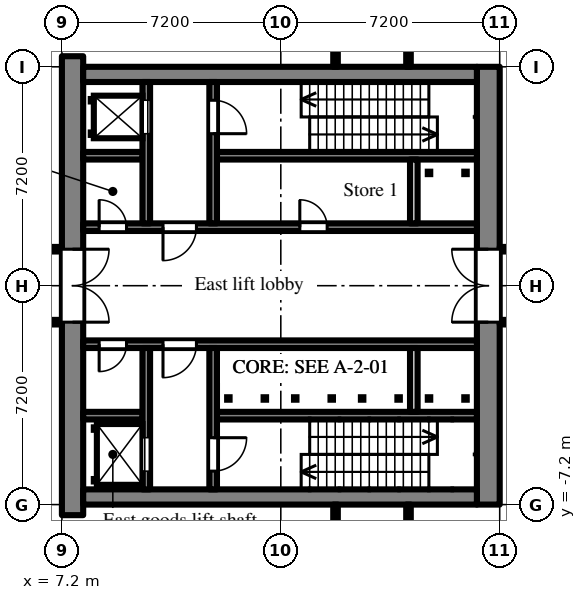
"""IFC4 building model, lengths in metres.
Left out: names, types, materials, properties, quantities, classifications, styles, units other than length and angle.
Written with IfcOpenShell. Run it as: python <this file> out.ifc"""

import sys

from ifc_helpers import new_model, si_unit, direction, frame, frame_2d, origin, place, context, subcontext, project, spatial, rectangle, extrude, element, fill, save


model = new_model("IFC4")
c1 = context("Model", 3, precision=1e-05, world=origin(), true_north=direction((0.0, 1.0)))
c2 = subcontext(c1, "Body", "Model", "MODEL_VIEW")
j1 = project(units=[si_unit("LENGTHUNIT", "METRE"), si_unit("PLANEANGLEUNIT", "RADIAN")], contexts=[c1])
p1 = place(None, origin())
s1 = spatial("IfcSite", under=j1, at=p1, CompositionType="ELEMENT")
p2 = place(p1, origin())
s2 = spatial("IfcBuilding", under=s1, at=p2, CompositionType="ELEMENT")
p3 = place(p2, frame((0.0, 0.0, -4.8)))
s3 = spatial("IfcBuildingStorey", under=s2, at=p3, CompositionType="ELEMENT", Elevation=-4.8)
p4 = place(p3, frame((7.55, -7.548, 0.0), z_axis=(0.0, 0.0, 1.0), x_axis=(0.0, 1.0, 0.0)))
e1 = element("IfcWall", 1, at=p4, inside=s3, PredefinedType="SHEAR", context=c2, shape_type="SweptSolid", body=[
    extrude(rectangle(XDim=15.096, YDim=0.7, at=frame_2d((7.548, 0.0))), origin(), (0.0, 0.0, 1.0), 4.35),
])
p5 = place(p4, frame((6.348, 0.0, 0.0)))
e2 = element("IfcOpeningElement", 2, at=p5, cuts=e1, PredefinedType="OPENING", context=c2, shape_type="SweptSolid", body=[
    extrude(rectangle(XDim=2.4, YDim=2.2, at=frame_2d((1.2, 1.1))), frame((0.0, 0.36, 0.0), z_axis=(0.0, -1.0, 0.0), x_axis=(1.0, 0.0, 0.0)), (0.0, 0.0, 1.0), 0.72),
])
p6 = place(p3, frame((21.225, -7.2, 0.0), z_axis=(0.0, 0.0, 1.0), x_axis=(0.0, 1.0, 0.0)))
e3 = element("IfcWall", 3, at=p6, inside=s3, PredefinedType="SHEAR", context=c2, shape_type="SweptSolid", body=[
    extrude(rectangle(XDim=14.4, YDim=0.75, at=frame_2d((7.2, 0.0))), origin(), (0.0, 0.0, 1.0), 4.35),
])
p7 = place(p6, frame((6.0, 0.0, 0.0)))
e4 = element("IfcOpeningElement", 4, at=p7, cuts=e3, PredefinedType="OPENING", context=c2, shape_type="SweptSolid", body=[
    extrude(rectangle(XDim=2.4, YDim=2.2, at=frame_2d((1.2, 1.1))), frame((0.0, 0.385, 0.0), z_axis=(0.0, -1.0, 0.0), x_axis=(1.0, 0.0, 0.0)), (0.0, 0.0, 1.0), 0.77),
])
p8 = place(p3, frame((7.9, 6.95, 0.0), z_axis=(0.0, 0.0, 1.0), x_axis=(1.0, 0.0, 0.0)))
e5 = element("IfcWall", 5, at=p8, inside=s3, PredefinedType="SHEAR", context=c2, shape_type="SweptSolid", body=[
    extrude(rectangle(XDim=12.95, YDim=0.5, at=frame_2d((6.475, 0.0))), origin(), (0.0, 0.0, 1.0), 4.35),
])
p9 = place(p3, frame((7.9, 1.925, 0.0), z_axis=(0.0, 0.0, 1.0), x_axis=(1.0, 0.0, 0.0)))
e6 = element("IfcWall", 6, at=p9, inside=s3, PredefinedType="SHEAR", context=c2, shape_type="SweptSolid", body=[
    extrude(rectangle(XDim=12.95, YDim=0.25, at=frame_2d((6.475, 0.0))), origin(), (0.0, 0.0, 1.0), 4.35),
])
p10 = place(p9, frame((0.525, 0.0, 0.0)))
e7 = element("IfcOpeningElement", 7, at=p10, cuts=e6, PredefinedType="OPENING", context=c2, shape_type="SweptSolid", body=[
    extrude(rectangle(XDim=0.9, YDim=2.1, at=frame_2d((0.45, 1.05))), frame((0.0, 0.135, 0.0), z_axis=(0.0, -1.0, 0.0), x_axis=(1.0, 0.0, 0.0)), (0.0, 0.0, 1.0), 0.27),
])
p11 = place(p9, frame((2.625, 0.0, 0.0)))
e8 = element("IfcOpeningElement", 8, at=p11, cuts=e6, PredefinedType="OPENING", context=c2, shape_type="SweptSolid", body=[
    extrude(rectangle(XDim=1.1, YDim=2.1, at=frame_2d((0.55, 1.05))), frame((0.0, 0.135, 0.0), z_axis=(0.0, -1.0, 0.0), x_axis=(1.0, 0.0, 0.0)), (0.0, 0.0, 1.0), 0.27),
])
p12 = place(p9, frame((7.125, 0.0, 0.0)))
e9 = element("IfcOpeningElement", 9, at=p12, cuts=e6, PredefinedType="OPENING", context=c2, shape_type="SweptSolid", body=[
    extrude(rectangle(XDim=0.9, YDim=2.1, at=frame_2d((0.45, 1.05))), frame((0.0, 0.135, 0.0), z_axis=(0.0, -1.0, 0.0), x_axis=(1.0, 0.0, 0.0)), (0.0, 0.0, 1.0), 0.27),
])
p13 = place(p3, frame((7.9, 4.275, 0.0), z_axis=(0.0, 0.0, 1.0), x_axis=(1.0, 0.0, 0.0)))
e10 = element("IfcWall", 10, at=p13, inside=s3, PredefinedType="SHEAR", context=c2, shape_type="SweptSolid", body=[
    extrude(rectangle(XDim=1.95, YDim=0.25, at=frame_2d((0.975, 0.0))), origin(), (0.0, 0.0, 1.0), 4.35),
])
p14 = place(p3, frame((12.3, 4.275, 0.0), z_axis=(0.0, 0.0, 1.0), x_axis=(1.0, 0.0, 0.0)))
e11 = element("IfcWall", 11, at=p14, inside=s3, PredefinedType="SHEAR", context=c2, shape_type="SweptSolid", body=[
    extrude(rectangle(XDim=8.55, YDim=0.25, at=frame_2d((4.275, 0.0))), origin(), (0.0, 0.0, 1.0), 4.35),
])
p15 = place(p3, frame((9.975, 2.05, 0.0), z_axis=(0.0, 0.0, 1.0), x_axis=(0.0, 1.0, 0.0)))
e12 = element("IfcWall", 12, at=p15, inside=s3, PredefinedType="SHEAR", context=c2, shape_type="SweptSolid", body=[
    extrude(rectangle(XDim=4.65, YDim=0.25, at=frame_2d((2.325, 0.0))), origin(), (0.0, 0.0, 1.0), 4.35),
])
p16 = place(p15, frame((2.95, 0.0, 0.0)))
e13 = element("IfcOpeningElement", 13, at=p16, cuts=e12, PredefinedType="OPENING", context=c2, shape_type="SweptSolid", body=[
    extrude(rectangle(XDim=1.1, YDim=2.1, at=frame_2d((0.55, 1.05))), frame((0.0, 0.135, 0.0), z_axis=(0.0, -1.0, 0.0), x_axis=(1.0, 0.0, 0.0)), (0.0, 0.0, 1.0), 0.27),
])
p17 = place(p3, frame((12.175, 2.05, 0.0), z_axis=(0.0, 0.0, 1.0), x_axis=(0.0, 1.0, 0.0)))
e14 = element("IfcWall", 14, at=p17, inside=s3, PredefinedType="SHEAR", context=c2, shape_type="SweptSolid", body=[
    extrude(rectangle(XDim=4.65, YDim=0.25, at=frame_2d((2.325, 0.0))), origin(), (0.0, 0.0, 1.0), 4.35),
])
p18 = place(p17, frame((2.95, 0.0, 0.0)))
e15 = element("IfcOpeningElement", 15, at=p18, cuts=e14, PredefinedType="OPENING", context=c2, shape_type="SweptSolid", body=[
    extrude(rectangle(XDim=1.1, YDim=2.1, at=frame_2d((0.55, 1.05))), frame((0.0, 0.135, 0.0), z_axis=(0.0, -1.0, 0.0), x_axis=(1.0, 0.0, 0.0)), (0.0, 0.0, 1.0), 0.27),
])
p19 = place(p3, frame((18.775, 2.05, 0.0), z_axis=(0.0, 0.0, 1.0), x_axis=(0.0, 1.0, 0.0)))
e16 = element("IfcWall", 16, at=p19, inside=s3, PredefinedType="PARTITIONING", context=c2, shape_type="SweptSolid", body=[
    extrude(rectangle(XDim=2.1, YDim=0.25, at=frame_2d((1.05, 0.0))), origin(), (0.0, 0.0, 1.0), 4.35),
])
p20 = place(p3, frame((7.9, -6.95, 0.0), z_axis=(0.0, 0.0, 1.0), x_axis=(1.0, 0.0, 0.0)))
e17 = element("IfcWall", 17, at=p20, inside=s3, PredefinedType="SHEAR", context=c2, shape_type="SweptSolid", body=[
    extrude(rectangle(XDim=12.95, YDim=0.5, at=frame_2d((6.475, 0.0))), origin(), (0.0, 0.0, 1.0), 4.35),
])
p21 = place(p3, frame((7.9, -1.925, 0.0), z_axis=(0.0, 0.0, 1.0), x_axis=(1.0, 0.0, 0.0)))
e18 = element("IfcWall", 18, at=p21, inside=s3, PredefinedType="SHEAR", context=c2, shape_type="SweptSolid", body=[
    extrude(rectangle(XDim=12.95, YDim=0.25, at=frame_2d((6.475, 0.0))), origin(), (0.0, 0.0, 1.0), 4.35),
])
p22 = place(p21, frame((0.525, 0.0, 0.0)))
e19 = element("IfcOpeningElement", 19, at=p22, cuts=e18, PredefinedType="OPENING", context=c2, shape_type="SweptSolid", body=[
    extrude(rectangle(XDim=0.9, YDim=2.1, at=frame_2d((0.45, 1.05))), frame((0.0, 0.135, 0.0), z_axis=(0.0, -1.0, 0.0), x_axis=(1.0, 0.0, 0.0)), (0.0, 0.0, 1.0), 0.27),
])
p23 = place(p21, frame((2.625, 0.0, 0.0)))
e20 = element("IfcOpeningElement", 20, at=p23, cuts=e18, PredefinedType="OPENING", context=c2, shape_type="SweptSolid", body=[
    extrude(rectangle(XDim=1.1, YDim=2.1, at=frame_2d((0.55, 1.05))), frame((0.0, 0.135, 0.0), z_axis=(0.0, -1.0, 0.0), x_axis=(1.0, 0.0, 0.0)), (0.0, 0.0, 1.0), 0.27),
])
p24 = place(p3, frame((7.9, -4.275, 0.0), z_axis=(0.0, 0.0, 1.0), x_axis=(1.0, 0.0, 0.0)))
e21 = element("IfcWall", 21, at=p24, inside=s3, PredefinedType="SHEAR", context=c2, shape_type="SweptSolid", body=[
    extrude(rectangle(XDim=1.95, YDim=0.25, at=frame_2d((0.975, 0.0))), origin(), (0.0, 0.0, 1.0), 4.35),
])
p25 = place(p3, frame((12.3, -4.275, 0.0), z_axis=(0.0, 0.0, 1.0), x_axis=(1.0, 0.0, 0.0)))
e22 = element("IfcWall", 22, at=p25, inside=s3, PredefinedType="SHEAR", context=c2, shape_type="SweptSolid", body=[
    extrude(rectangle(XDim=8.55, YDim=0.25, at=frame_2d((4.275, 0.0))), origin(), (0.0, 0.0, 1.0), 4.35),
])
p26 = place(p3, frame((9.975, -2.05, 0.0), z_axis=(0.0, 0.0, 1.0), x_axis=(0.0, -1.0, 0.0)))
e23 = element("IfcWall", 23, at=p26, inside=s3, PredefinedType="SHEAR", context=c2, shape_type="SweptSolid", body=[
    extrude(rectangle(XDim=4.65, YDim=0.25, at=frame_2d((2.325, 0.0))), origin(), (0.0, 0.0, 1.0), 4.35),
])
p27 = place(p26, frame((2.95, 0.0, 0.0)))
e24 = element("IfcOpeningElement", 24, at=p27, cuts=e23, PredefinedType="OPENING", context=c2, shape_type="SweptSolid", body=[
    extrude(rectangle(XDim=1.1, YDim=2.1, at=frame_2d((0.55, 1.05))), frame((0.0, 0.135, 0.0), z_axis=(0.0, -1.0, 0.0), x_axis=(1.0, 0.0, 0.0)), (0.0, 0.0, 1.0), 0.27),
])
p28 = place(p3, frame((12.175, -2.05, 0.0), z_axis=(0.0, 0.0, 1.0), x_axis=(0.0, -1.0, 0.0)))
e25 = element("IfcWall", 25, at=p28, inside=s3, PredefinedType="SHEAR", context=c2, shape_type="SweptSolid", body=[
    extrude(rectangle(XDim=4.65, YDim=0.25, at=frame_2d((2.325, 0.0))), origin(), (0.0, 0.0, 1.0), 4.35),
])
p29 = place(p28, frame((2.95, 0.0, 0.0)))
e26 = element("IfcOpeningElement", 26, at=p29, cuts=e25, PredefinedType="OPENING", context=c2, shape_type="SweptSolid", body=[
    extrude(rectangle(XDim=1.1, YDim=2.1, at=frame_2d((0.55, 1.05))), frame((0.0, 0.135, 0.0), z_axis=(0.0, -1.0, 0.0), x_axis=(1.0, 0.0, 0.0)), (0.0, 0.0, 1.0), 0.27),
])
p30 = place(p3, frame((18.775, -2.05, 0.0), z_axis=(0.0, 0.0, 1.0), x_axis=(0.0, -1.0, 0.0)))
e27 = element("IfcWall", 27, at=p30, inside=s3, PredefinedType="PARTITIONING", context=c2, shape_type="SweptSolid", body=[
    extrude(rectangle(XDim=2.1, YDim=0.25, at=frame_2d((1.05, 0.0))), origin(), (0.0, 0.0, 1.0), 4.35),
])
p31 = place(p3, frame((1.275, -1.2, 0.0), z_axis=(0.0, 0.0, 1.0), x_axis=(1.0, 0.0, 0.0)))
e28 = element("IfcWall", 28, at=p31, inside=s3, PredefinedType="PARTITIONING", context=c2, shape_type="SweptSolid", body=[
    extrude(rectangle(XDim=5.925, YDim=0.15, at=frame_2d((2.962, 0.0))), origin(), (0.0, 0.0, 1.0), 4.35),
])
p32 = place(p3, frame((1.275, 1.2, 0.0), z_axis=(0.0, 0.0, 1.0), x_axis=(1.0, 0.0, 0.0)))
e29 = element("IfcWall", 29, at=p32, inside=s3, PredefinedType="PARTITIONING", context=c2, shape_type="SweptSolid", body=[
    extrude(rectangle(XDim=5.925, YDim=0.15, at=frame_2d((2.962, 0.0))), origin(), (0.0, 0.0, 1.0), 4.35),
])
p33 = place(p32, frame((0.575, 0.0, 0.0)))
e30 = element("IfcOpeningElement", 30, at=p33, cuts=e29, PredefinedType="OPENING", context=c2, shape_type="SweptSolid", body=[
    extrude(rectangle(XDim=1.8, YDim=2.1, at=frame_2d((0.9, 1.05))), frame((0.0, 0.085, 0.0), z_axis=(0.0, -1.0, 0.0), x_axis=(1.0, 0.0, 0.0)), (0.0, 0.0, 1.0), 0.17),
])
p34 = place(p3, frame((16.2, -16.725, 0.0), z_axis=(0.0, 0.0, 1.0), x_axis=(0.0, 1.0, 0.0)))
e31 = element("IfcWall", 31, at=p34, inside=s3, PredefinedType="PARTITIONING", context=c2, shape_type="SweptSolid", body=[
    extrude(rectangle(XDim=9.525, YDim=0.15, at=frame_2d((4.763, 0.0))), origin(), (0.0, 0.0, 1.0), 4.35),
])
p35 = place(p34, frame((3.525, 0.0, 0.0)))
e32 = element("IfcOpeningElement", 32, at=p35, cuts=e31, PredefinedType="OPENING", context=c2, shape_type="SweptSolid", body=[
    extrude(rectangle(XDim=2.4, YDim=2.1, at=frame_2d((1.2, 1.05))), frame((0.0, 0.085, 0.0), z_axis=(0.0, -1.0, 0.0), x_axis=(1.0, 0.0, 0.0)), (0.0, 0.0, 1.0), 0.17),
])
p36 = place(p3, frame((16.2, 7.2, 0.0), z_axis=(0.0, 0.0, 1.0), x_axis=(0.0, 1.0, 0.0)))
e33 = element("IfcWall", 33, at=p36, inside=s3, PredefinedType="PARTITIONING", context=c2, shape_type="SweptSolid", body=[
    extrude(rectangle(XDim=9.525, YDim=0.15, at=frame_2d((4.763, 0.0))), origin(), (0.0, 0.0, 1.0), 4.35),
])
p37 = place(p36, frame((3.05, 0.0, 0.0)))
e34 = element("IfcOpeningElement", 34, at=p37, cuts=e33, PredefinedType="OPENING", context=c2, shape_type="SweptSolid", body=[
    extrude(rectangle(XDim=1.8, YDim=2.1, at=frame_2d((0.9, 1.05))), frame((0.0, 0.085, 0.0), z_axis=(0.0, -1.0, 0.0), x_axis=(1.0, 0.0, 0.0)), (0.0, 0.0, 1.0), 0.17),
])
p38 = place(p3, frame((18.6, -16.875, 0.0), z_axis=(0.0, 0.0, 1.0), x_axis=(0.0, 1.0, 0.0)))
e35 = element("IfcWall", 35, at=p38, inside=s3, PredefinedType="PARTITIONING", context=c2, shape_type="SweptSolid", body=[
    extrude(rectangle(XDim=9.675, YDim=0.15, at=frame_2d((4.837, 0.0))), origin(), (0.0, 0.0, 1.0), 4.35),
])
p39 = place(p38, frame((7.225, 0.0, 0.0)))
e36 = element("IfcOpeningElement", 36, at=p39, cuts=e35, PredefinedType="OPENING", context=c2, shape_type="SweptSolid", body=[
    extrude(rectangle(XDim=1.8, YDim=2.1, at=frame_2d((0.9, 1.05))), frame((0.0, 0.085, 0.0), z_axis=(0.0, -1.0, 0.0), x_axis=(1.0, 0.0, 0.0)), (0.0, 0.0, 1.0), 0.17),
])
p40 = place(p3, frame((18.6, 7.2, 0.0), z_axis=(0.0, 0.0, 1.0), x_axis=(0.0, 1.0, 0.0)))
e37 = element("IfcWall", 37, at=p40, inside=s3, PredefinedType="PARTITIONING", context=c2, shape_type="SweptSolid", body=[
    extrude(rectangle(XDim=9.675, YDim=0.15, at=frame_2d((4.837, 0.0))), origin(), (0.0, 0.0, 1.0), 4.35),
])
p41 = place(p40, frame((0.85, 0.0, 0.0)))
e38 = element("IfcOpeningElement", 38, at=p41, cuts=e37, PredefinedType="OPENING", context=c2, shape_type="SweptSolid", body=[
    extrude(rectangle(XDim=1.8, YDim=2.1, at=frame_2d((0.9, 1.05))), frame((0.0, 0.085, 0.0), z_axis=(0.0, -1.0, 0.0), x_axis=(1.0, 0.0, 0.0)), (0.0, 0.0, 1.0), 0.17),
])
p42 = place(p40, frame((7.15, 0.0, 0.0)))
e39 = element("IfcOpeningElement", 39, at=p42, cuts=e37, PredefinedType="OPENING", context=c2, shape_type="SweptSolid", body=[
    extrude(rectangle(XDim=1.8, YDim=2.1, at=frame_2d((0.9, 1.05))), frame((0.0, 0.085, 0.0), z_axis=(0.0, -1.0, 0.0), x_axis=(1.0, 0.0, 0.0)), (0.0, 0.0, 1.0), 0.17),
])
p43 = place(p3, frame((21.6, -1.2, 0.0), z_axis=(0.0, 0.0, 1.0), x_axis=(1.0, 0.0, 0.0)))
e40 = element("IfcWall", 40, at=p43, inside=s3, PredefinedType="PARTITIONING", context=c2, shape_type="SweptSolid", body=[
    extrude(rectangle(XDim=9.525, YDim=0.15, at=frame_2d((4.762, 0.0))), origin(), (0.0, 0.0, 1.0), 4.35),
])
p44 = place(p43, frame((0.85, 0.0, 0.0)))
e41 = element("IfcOpeningElement", 41, at=p44, cuts=e40, PredefinedType="OPENING", context=c2, shape_type="SweptSolid", body=[
    extrude(rectangle(XDim=1.8, YDim=2.1, at=frame_2d((0.9, 1.05))), frame((0.0, 0.085, 0.0), z_axis=(0.0, -1.0, 0.0), x_axis=(1.0, 0.0, 0.0)), (0.0, 0.0, 1.0), 0.17),
])
p45 = place(p43, frame((7.15, 0.0, 0.0)))
e42 = element("IfcOpeningElement", 42, at=p45, cuts=e40, PredefinedType="OPENING", context=c2, shape_type="SweptSolid", body=[
    extrude(rectangle(XDim=1.8, YDim=2.1, at=frame_2d((0.9, 1.05))), frame((0.0, 0.085, 0.0), z_axis=(0.0, -1.0, 0.0), x_axis=(1.0, 0.0, 0.0)), (0.0, 0.0, 1.0), 0.17),
])
p46 = place(p3, frame((21.6, 1.2, 0.0), z_axis=(0.0, 0.0, 1.0), x_axis=(1.0, 0.0, 0.0)))
e43 = element("IfcWall", 43, at=p46, inside=s3, PredefinedType="PARTITIONING", context=c2, shape_type="SweptSolid", body=[
    extrude(rectangle(XDim=9.525, YDim=0.15, at=frame_2d((4.762, 0.0))), origin(), (0.0, 0.0, 1.0), 4.35),
])
p47 = place(p46, frame((0.65, 0.0, 0.0)))
e44 = element("IfcOpeningElement", 44, at=p47, cuts=e43, PredefinedType="OPENING", context=c2, shape_type="SweptSolid", body=[
    extrude(rectangle(XDim=1.8, YDim=2.1, at=frame_2d((0.9, 1.05))), frame((0.0, 0.085, 0.0), z_axis=(0.0, -1.0, 0.0), x_axis=(1.0, 0.0, 0.0)), (0.0, 0.0, 1.0), 0.17),
])
p48 = place(p16, origin())
e45 = element("IfcDoor", 45, at=p48, inside=s3, OperationType="SLIDING_TO_LEFT", PredefinedType="DOOR", context=c2, shape_type="SweptSolid", body=[
    extrude(rectangle(XDim=1.1, YDim=2.1, at=frame_2d((0.55, 1.05))), frame((0.0, 0.025, 0.0), z_axis=(0.0, -1.0, 0.0), x_axis=(1.0, 0.0, 0.0)), (0.0, 0.0, 1.0), 0.05),
])
fill(e13, e45)
p49 = place(p27, origin())
e46 = element("IfcDoor", 46, at=p49, inside=s3, OperationType="SLIDING_TO_LEFT", PredefinedType="DOOR", context=c2, shape_type="SweptSolid", body=[
    extrude(rectangle(XDim=1.1, YDim=2.1, at=frame_2d((0.55, 1.05))), frame((0.0, 0.025, 0.0), z_axis=(0.0, -1.0, 0.0), x_axis=(1.0, 0.0, 0.0)), (0.0, 0.0, 1.0), 0.05),
])
fill(e24, e46)
p50 = place(p18, frame((1.1, 0.0, 0.0), z_axis=(0.0, 0.0, 1.0), x_axis=(-1.0, 0.0, 0.0)))
e47 = element("IfcDoor", 47, at=p50, inside=s3, OperationType="SINGLE_SWING_RIGHT", PredefinedType="DOOR", context=c2, shape_type="SweptSolid", body=[
    extrude(rectangle(XDim=1.1, YDim=2.1, at=frame_2d((0.55, 1.05))), frame((0.0, 0.025, 0.0), z_axis=(0.0, -1.0, 0.0), x_axis=(1.0, 0.0, 0.0)), (0.0, 0.0, 1.0), 0.05),
])
fill(e15, e47)
p51 = place(p29, origin())
e48 = element("IfcDoor", 48, at=p51, inside=s3, OperationType="SINGLE_SWING_LEFT", PredefinedType="DOOR", context=c2, shape_type="SweptSolid", body=[
    extrude(rectangle(XDim=1.1, YDim=2.1, at=frame_2d((0.55, 1.05))), frame((0.0, 0.025, 0.0), z_axis=(0.0, -1.0, 0.0), x_axis=(1.0, 0.0, 0.0)), (0.0, 0.0, 1.0), 0.05),
])
fill(e26, e48)
p52 = place(p10, origin())
e49 = element("IfcDoor", 49, at=p52, inside=s3, OperationType="SINGLE_SWING_LEFT", PredefinedType="DOOR", context=c2, shape_type="SweptSolid", body=[
    extrude(rectangle(XDim=0.9, YDim=2.1, at=frame_2d((0.45, 1.05))), frame((0.0, 0.025, 0.0), z_axis=(0.0, -1.0, 0.0), x_axis=(1.0, 0.0, 0.0)), (0.0, 0.0, 1.0), 0.05),
])
fill(e7, e49)
p53 = place(p22, frame((0.9, 0.0, 0.0), z_axis=(0.0, 0.0, 1.0), x_axis=(-1.0, 0.0, 0.0)))
e50 = element("IfcDoor", 50, at=p53, inside=s3, OperationType="SINGLE_SWING_RIGHT", PredefinedType="DOOR", context=c2, shape_type="SweptSolid", body=[
    extrude(rectangle(XDim=0.9, YDim=2.1, at=frame_2d((0.45, 1.05))), frame((0.0, 0.025, 0.0), z_axis=(0.0, -1.0, 0.0), x_axis=(1.0, 0.0, 0.0)), (0.0, 0.0, 1.0), 0.05),
])
fill(e19, e50)
p54 = place(p11, frame((1.1, 0.0, 0.0), z_axis=(0.0, 0.0, 1.0), x_axis=(-1.0, 0.0, 0.0)))
e51 = element("IfcDoor", 51, at=p54, inside=s3, OperationType="SINGLE_SWING_RIGHT", PredefinedType="DOOR", context=c2, shape_type="SweptSolid", body=[
    extrude(rectangle(XDim=1.1, YDim=2.1, at=frame_2d((0.55, 1.05))), frame((0.0, 0.025, 0.0), z_axis=(0.0, -1.0, 0.0), x_axis=(1.0, 0.0, 0.0)), (0.0, 0.0, 1.0), 0.05),
])
fill(e8, e51)
p55 = place(p23, frame((1.1, 0.0, 0.0), z_axis=(0.0, 0.0, 1.0), x_axis=(-1.0, 0.0, 0.0)))
e52 = element("IfcDoor", 52, at=p55, inside=s3, OperationType="SINGLE_SWING_RIGHT", PredefinedType="DOOR", context=c2, shape_type="SweptSolid", body=[
    extrude(rectangle(XDim=1.1, YDim=2.1, at=frame_2d((0.55, 1.05))), frame((0.0, 0.025, 0.0), z_axis=(0.0, -1.0, 0.0), x_axis=(1.0, 0.0, 0.0)), (0.0, 0.0, 1.0), 0.05),
])
fill(e20, e52)
p56 = place(p5, frame((2.4, 0.0, 0.0), z_axis=(0.0, 0.0, 1.0), x_axis=(-1.0, 0.0, 0.0)))
e53 = element("IfcDoor", 53, at=p56, inside=s3, OperationType="DOUBLE_DOOR_DOUBLE_SWING", PredefinedType="DOOR", context=c2, shape_type="SweptSolid", body=[
    extrude(rectangle(XDim=2.4, YDim=2.2, at=frame_2d((1.2, 1.1))), frame((0.0, 0.025, 0.0), z_axis=(0.0, -1.0, 0.0), x_axis=(1.0, 0.0, 0.0)), (0.0, 0.0, 1.0), 0.05),
])
fill(e2, e53)
p57 = place(p7, origin())
e54 = element("IfcDoor", 54, at=p57, inside=s3, OperationType="DOUBLE_DOOR_DOUBLE_SWING", PredefinedType="DOOR", context=c2, shape_type="SweptSolid", body=[
    extrude(rectangle(XDim=2.4, YDim=2.2, at=frame_2d((1.2, 1.1))), frame((0.0, 0.025, 0.0), z_axis=(0.0, -1.0, 0.0), x_axis=(1.0, 0.0, 0.0)), (0.0, 0.0, 1.0), 0.05),
])
fill(e4, e54)
p58 = place(p12, origin())
e55 = element("IfcDoor", 55, at=p58, inside=s3, OperationType="SINGLE_SWING_LEFT", PredefinedType="DOOR", context=c2, shape_type="SweptSolid", body=[
    extrude(rectangle(XDim=0.9, YDim=2.1, at=frame_2d((0.45, 1.05))), frame((0.0, 0.025, 0.0), z_axis=(0.0, -1.0, 0.0), x_axis=(1.0, 0.0, 0.0)), (0.0, 0.0, 1.0), 0.05),
])
fill(e9, e55)
save(model, sys.argv[1])
